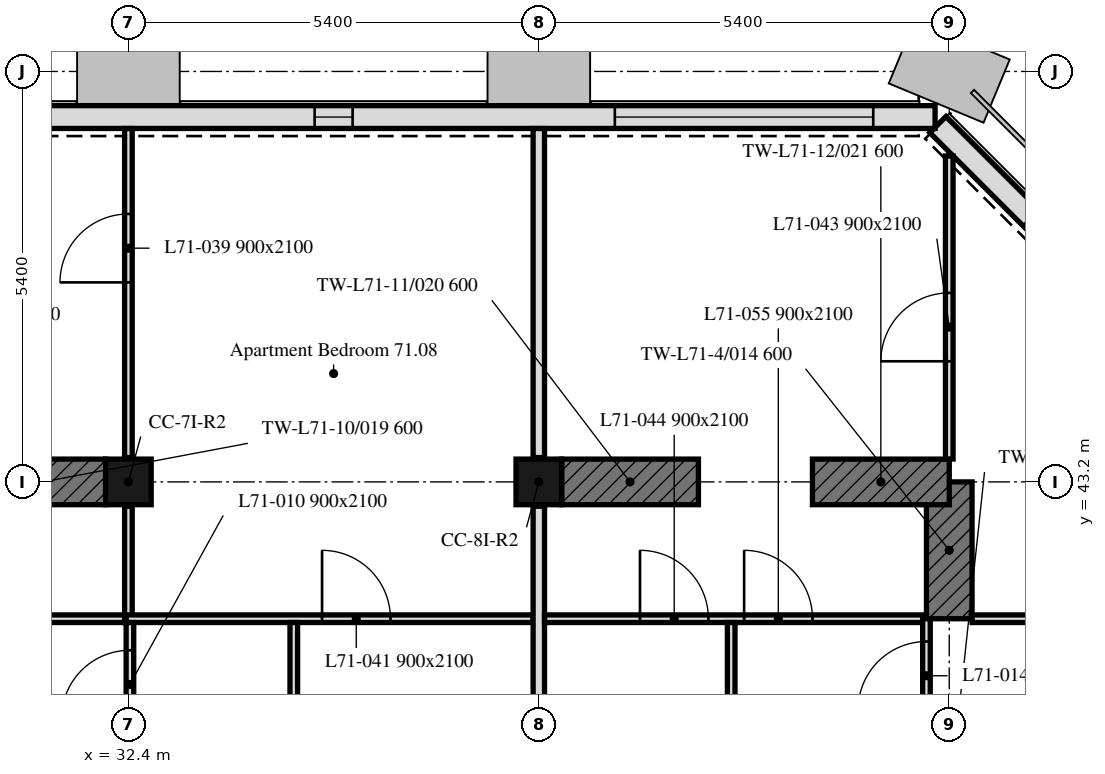
"""IFC4 building model, lengths in metres.
Left out: names, types, materials, properties, quantities, classifications, styles, units other than length and angle.
Written with IfcOpenShell. Run it as: python <this file> out.ifc"""

import sys

from ifc_helpers import new_model, si_unit, direction, frame, frame_2d, origin, origin_2d, place, context, subcontext, project, spatial, rectangle, extrude, element, fill, save


model = new_model("IFC4")
c1 = context("Model", 3, precision=1e-05, world=origin(), true_north=direction((0.0, 1.0)))
c2 = subcontext(c1, "Body", "Model", "MODEL_VIEW")
j1 = project(units=[si_unit("LENGTHUNIT", "METRE"), si_unit("PLANEANGLEUNIT", "RADIAN")], contexts=[c1])
p1 = place(None, origin())
s1 = spatial("IfcSite", under=j1, at=p1, CompositionType="ELEMENT")
p2 = place(p1, origin())
s2 = spatial("IfcBuilding", under=s1, at=p2, CompositionType="ELEMENT")
p3 = place(p2, frame((0.0, 0.0, 288.4)))
s3 = spatial("IfcBuildingStorey", under=s2, at=p3, CompositionType="ELEMENT", Elevation=288.4)
for number, where, z_axis, x_axis in (
    (1, (32.4, 43.2, 0.0), (0.0, 0.0, 1.0), (1.0, 0.0, 0.0)),
    (2, (37.8, 43.2, 0.0), (0.0, 0.0, 1.0), (1.0, 0.0, 0.0)),
):
    element("IfcColumn", number, at=place(p3, frame(where, z_axis=z_axis, x_axis=x_axis)), inside=s3, PredefinedType="COLUMN", context=c2, shape_type="SweptSolid", body=[
        extrude(rectangle(XDim=0.6, YDim=0.6, at=origin_2d()), origin(), (0.0, 0.0, 1.0), 3.0),
    ])
p4 = place(p3, frame((43.2, 41.4, 0.0), z_axis=(0.0, 0.0, 1.0), x_axis=(0.0, 1.0, 0.0)))
e3 = element("IfcWall", 3, at=p4, inside=s3, PredefinedType="SHEAR", context=c2, shape_type="SweptSolid", body=[
    extrude(rectangle(XDim=1.8, YDim=0.6, at=frame_2d((0.9, 0.0))), origin(), (0.0, 0.0, 1.0), 3.0),
])
p5 = place(p3, frame((30.45, 43.2, 0.0), z_axis=(0.0, 0.0, 1.0), x_axis=(1.0, 0.0, 0.0)))
e4 = element("IfcWall", 4, at=p5, inside=s3, PredefinedType="SHEAR", context=c2, shape_type="SweptSolid", body=[
    extrude(rectangle(XDim=1.65, YDim=0.6, at=frame_2d((0.825, 0.0))), origin(), (0.0, 0.0, 1.0), 3.0),
])
p6 = place(p3, frame((38.1, 43.2, 0.0), z_axis=(0.0, 0.0, 1.0), x_axis=(1.0, 0.0, 0.0)))
e5 = element("IfcWall", 5, at=p6, inside=s3, PredefinedType="SHEAR", context=c2, shape_type="SweptSolid", body=[
    extrude(rectangle(XDim=1.8, YDim=0.6, at=frame_2d((0.9, 0.0))), origin(), (0.0, 0.0, 1.0), 3.0),
])
p7 = place(p3, frame((41.4, 43.2, 0.0), z_axis=(0.0, 0.0, 1.0), x_axis=(1.0, 0.0, 0.0)))
e6 = element("IfcWall", 6, at=p7, inside=s3, PredefinedType="SHEAR", context=c2, shape_type="SweptSolid", body=[
    extrude(rectangle(XDim=1.8, YDim=0.6, at=frame_2d((0.9, 0.0))), origin(), (0.0, 0.0, 1.0), 3.0),
])
p8 = place(p3, frame((47.901, 43.051, 0.0), z_axis=(0.0, 0.0, 1.0), x_axis=(-0.707106781187, 0.707106781187, 0.0)))
e7 = element("IfcWall", 7, at=p8, inside=s3, PredefinedType="SOLIDWALL", context=c2, shape_type="SweptSolid", body=[
    extrude(rectangle(XDim=6.86, YDim=0.3, at=frame_2d((3.43, 0.0))), origin(), (0.0, 0.0, 1.0), 3.0),
])
p9 = place(p8, frame((1.73, 0.0, 0.9)))
e8 = element("IfcOpeningElement", 8, at=p9, cuts=e7, PredefinedType="OPENING", context=c2, shape_type="SweptSolid", body=[
    extrude(rectangle(XDim=3.4, YDim=1.7, at=frame_2d((1.7, 0.85))), frame((0.0, 0.16, 0.0), z_axis=(0.0, -1.0, 0.0), x_axis=(1.0, 0.0, 0.0)), (0.0, 0.0, 1.0), 0.32),
])
p10 = place(p3, frame((43.014, 48.0, 0.0), z_axis=(0.0, 0.0, 1.0), x_axis=(-1.0, 0.0, 0.0)))
e9 = element("IfcWall", 9, at=p10, inside=s3, PredefinedType="SOLIDWALL", context=c2, shape_type="SweptSolid", body=[
    extrude(rectangle(XDim=32.027, YDim=0.3, at=frame_2d((16.014, 0.0))), origin(), (0.0, 0.0, 1.0), 3.0),
])
p11 = place(p10, frame((0.814, 0.0, 0.9)))
e10 = element("IfcOpeningElement", 10, at=p11, cuts=e9, PredefinedType="OPENING", context=c2, shape_type="SweptSolid", body=[
    extrude(rectangle(XDim=3.4, YDim=1.7, at=frame_2d((1.7, 0.85))), frame((0.0, 0.16, 0.0), z_axis=(0.0, -1.0, 0.0), x_axis=(1.0, 0.0, 0.0)), (0.0, 0.0, 1.0), 0.32),
])
p12 = place(p10, frame((7.664, 0.0, 0.9)))
e11 = element("IfcOpeningElement", 11, at=p12, cuts=e9, PredefinedType="OPENING", context=c2, shape_type="SweptSolid", body=[
    extrude(rectangle(XDim=0.5, YDim=1.7, at=frame_2d((0.25, 0.85))), frame((0.0, 0.16, 0.0), z_axis=(0.0, -1.0, 0.0), x_axis=(1.0, 0.0, 0.0)), (0.0, 0.0, 1.0), 0.32),
])
p13 = place(p10, frame((13.064, 0.0, 0.9)))
e12 = element("IfcOpeningElement", 12, at=p13, cuts=e9, PredefinedType="OPENING", context=c2, shape_type="SweptSolid", body=[
    extrude(rectangle(XDim=0.5, YDim=1.7, at=frame_2d((0.25, 0.85))), frame((0.0, 0.16, 0.0), z_axis=(0.0, -1.0, 0.0), x_axis=(1.0, 0.0, 0.0)), (0.0, 0.0, 1.0), 0.32),
])
p14 = place(p10, frame((18.464, 0.0, 0.9)))
e13 = element("IfcOpeningElement", 13, at=p14, cuts=e9, PredefinedType="OPENING", context=c2, shape_type="SweptSolid", body=[
    extrude(rectangle(XDim=0.5, YDim=1.7, at=frame_2d((0.25, 0.85))), frame((0.0, 0.16, 0.0), z_axis=(0.0, -1.0, 0.0), x_axis=(1.0, 0.0, 0.0)), (0.0, 0.0, 1.0), 0.32),
])
p15 = place(p10, frame((23.864, 0.0, 0.9)))
e14 = element("IfcOpeningElement", 14, at=p15, cuts=e9, PredefinedType="OPENING", context=c2, shape_type="SweptSolid", body=[
    extrude(rectangle(XDim=0.5, YDim=1.7, at=frame_2d((0.25, 0.85))), frame((0.0, 0.16, 0.0), z_axis=(0.0, -1.0, 0.0), x_axis=(1.0, 0.0, 0.0)), (0.0, 0.0, 1.0), 0.32),
])
p16 = place(p10, frame((28.164, 0.0, 0.9)))
e15 = element("IfcOpeningElement", 15, at=p16, cuts=e9, PredefinedType="OPENING", context=c2, shape_type="SweptSolid", body=[
    extrude(rectangle(XDim=1.1, YDim=1.7, at=frame_2d((0.55, 0.85))), frame((0.0, 0.16, 0.0), z_axis=(0.0, -1.0, 0.0), x_axis=(1.0, 0.0, 0.0)), (0.0, 0.0, 1.0), 0.32),
])
p17 = place(p3, frame((32.4, 41.35, 0.0), z_axis=(0.0, 0.0, 1.0), x_axis=(0.0, 1.0, 0.0)))
e16 = element("IfcWall", 16, at=p17, inside=s3, PredefinedType="PARTITIONING", context=c2, shape_type="SweptSolid", body=[
    extrude(rectangle(XDim=1.53, YDim=0.1, at=frame_2d((0.765, 0.0))), origin(), (0.0, 0.0, 1.0), 2.4),
])
p18 = place(p3, frame((32.4, 43.52, 0.0), z_axis=(0.0, 0.0, 1.0), x_axis=(0.0, 1.0, 0.0)))
e17 = element("IfcWall", 17, at=p18, inside=s3, PredefinedType="PARTITIONING", context=c2, shape_type="SweptSolid", body=[
    extrude(rectangle(XDim=4.329, YDim=0.1, at=frame_2d((2.165, 0.0))), origin(), (0.0, 0.0, 1.0), 2.4),
])
p19 = place(p18, frame((2.305, 0.0, 0.0)))
e18 = element("IfcOpeningElement", 18, at=p19, cuts=e17, PredefinedType="OPENING", context=c2, shape_type="SweptSolid", body=[
    extrude(rectangle(XDim=0.9, YDim=2.1, at=frame_2d((0.45, 1.05))), frame((0.0, 0.05, 0.0), z_axis=(0.0, -1.0, 0.0), x_axis=(1.0, 0.0, 0.0)), (0.0, 0.0, 1.0), 0.1),
])
p20 = place(p3, frame((27.075, 41.4, 0.0), z_axis=(0.0, 0.0, 1.0), x_axis=(1.0, 0.0, 0.0)))
e19 = element("IfcWall", 19, at=p20, inside=s3, PredefinedType="PARTITIONING", context=c2, shape_type="SweptSolid", body=[
    extrude(rectangle(XDim=5.275, YDim=0.1, at=frame_2d((2.638, 0.0))), origin(), (0.0, 0.0, 1.0), 3.0),
])
p21 = place(p20, frame((1.495, 0.0, 0.0)))
e20 = element("IfcOpeningElement", 20, at=p21, cuts=e19, PredefinedType="OPENING", context=c2, shape_type="SweptSolid", body=[
    extrude(rectangle(XDim=0.9, YDim=2.1, at=frame_2d((0.45, 1.05))), frame((0.0, 0.05, 0.0), z_axis=(0.0, -1.0, 0.0), x_axis=(1.0, 0.0, 0.0)), (0.0, 0.0, 1.0), 0.1),
])
p22 = place(p20, frame((2.995, 0.0, 0.0)))
e21 = element("IfcOpeningElement", 21, at=p22, cuts=e19, PredefinedType="OPENING", context=c2, shape_type="SweptSolid", body=[
    extrude(rectangle(XDim=0.9, YDim=2.1, at=frame_2d((0.45, 1.05))), frame((0.0, 0.05, 0.0), z_axis=(0.0, -1.0, 0.0), x_axis=(1.0, 0.0, 0.0)), (0.0, 0.0, 1.0), 0.1),
])
p23 = place(p3, frame((37.8, 43.52, 0.0), z_axis=(0.0, 0.0, 1.0), x_axis=(0.0, 1.0, 0.0)))
e22 = element("IfcWall", 22, at=p23, inside=s3, PredefinedType="PARTITIONING", context=c2, shape_type="SweptSolid", body=[
    extrude(rectangle(XDim=4.329, YDim=0.15, at=frame_2d((2.165, 0.0))), origin(), (0.0, 0.0, 1.0), 2.4),
])
p24 = place(p3, frame((32.37, 41.4, 0.0), z_axis=(0.0, 0.0, 1.0), x_axis=(1.0, 0.0, 0.0)))
e23 = element("IfcWall", 23, at=p24, inside=s3, PredefinedType="PARTITIONING", context=c2, shape_type="SweptSolid", body=[
    extrude(rectangle(XDim=5.355, YDim=0.1, at=frame_2d((2.677, 0.0))), origin(), (0.0, 0.0, 1.0), 3.0),
])
p25 = place(p24, frame((2.578, 0.0, 0.0)))
e24 = element("IfcOpeningElement", 24, at=p25, cuts=e23, PredefinedType="OPENING", context=c2, shape_type="SweptSolid", body=[
    extrude(rectangle(XDim=0.9, YDim=2.1, at=frame_2d((0.45, 1.05))), frame((0.0, 0.05, 0.0), z_axis=(0.0, -1.0, 0.0), x_axis=(1.0, 0.0, 0.0)), (0.0, 0.0, 1.0), 0.1),
])
p26 = place(p3, frame((32.42, 38.12, 0.0), z_axis=(0.0, 0.0, 1.0), x_axis=(0.0, 1.0, 0.0)))
e25 = element("IfcWall", 25, at=p26, inside=s3, PredefinedType="PARTITIONING", context=c2, shape_type="SweptSolid", body=[
    extrude(rectangle(XDim=3.23, YDim=0.1, at=frame_2d((1.615, 0.0))), origin(), (0.0, 0.0, 1.0), 2.4),
])
p27 = place(p26, frame((1.965, 0.0, 0.0)))
e26 = element("IfcOpeningElement", 26, at=p27, cuts=e25, PredefinedType="OPENING", context=c2, shape_type="SweptSolid", body=[
    extrude(rectangle(XDim=0.9, YDim=2.1, at=frame_2d((0.45, 1.05))), frame((0.0, 0.05, 0.0), z_axis=(0.0, -1.0, 0.0), x_axis=(1.0, 0.0, 0.0)), (0.0, 0.0, 1.0), 0.1),
])
p28 = place(p3, frame((34.576, 34.725, 0.0), z_axis=(0.0, 0.0, 1.0), x_axis=(0.0, 1.0, 0.0)))
e27 = element("IfcWall", 27, at=p28, inside=s3, PredefinedType="PARTITIONING", context=c2, shape_type="SweptSolid", body=[
    extrude(rectangle(XDim=6.625, YDim=0.1, at=frame_2d((3.312, 0.0))), origin(), (0.0, 0.0, 1.0), 2.4),
])
p29 = place(p3, frame((37.8, 38.12, 0.0), z_axis=(0.0, 0.0, 1.0), x_axis=(0.0, 1.0, 0.0)))
e28 = element("IfcWall", 28, at=p29, inside=s3, PredefinedType="PARTITIONING", context=c2, shape_type="SweptSolid", body=[
    extrude(rectangle(XDim=4.76, YDim=0.15, at=frame_2d((2.38, 0.0))), origin(), (0.0, 0.0, 1.0), 2.4),
])
p30 = place(p3, frame((43.2, 43.501, 0.0), z_axis=(0.0, 0.0, 1.0), x_axis=(0.0, 1.0, 0.0)))
e29 = element("IfcWall", 29, at=p30, inside=s3, PredefinedType="PARTITIONING", context=c2, shape_type="SweptSolid", body=[
    extrude(rectangle(XDim=3.987, YDim=0.1, at=frame_2d((1.993, 0.0))), origin(), (0.0, 0.0, 1.0), 3.0),
])
p31 = place(p30, frame((1.286, 0.0, 0.0)))
e30 = element("IfcOpeningElement", 30, at=p31, cuts=e29, PredefinedType="OPENING", context=c2, shape_type="SweptSolid", body=[
    extrude(rectangle(XDim=0.9, YDim=2.1, at=frame_2d((0.45, 1.05))), frame((0.0, 0.05, 0.0), z_axis=(0.0, -1.0, 0.0), x_axis=(1.0, 0.0, 0.0)), (0.0, 0.0, 1.0), 0.1),
])
p32 = place(p3, frame((37.875, 41.4, 0.0), z_axis=(0.0, 0.0, 1.0), x_axis=(1.0, 0.0, 0.0)))
e31 = element("IfcWall", 31, at=p32, inside=s3, PredefinedType="PARTITIONING", context=c2, shape_type="SweptSolid", body=[
    extrude(rectangle(XDim=5.024, YDim=0.1, at=frame_2d((2.512, 0.0))), origin(), (0.0, 0.0, 1.0), 3.0),
])
p33 = place(p32, frame((1.256, 0.0, 0.0)))
e32 = element("IfcOpeningElement", 32, at=p33, cuts=e31, PredefinedType="OPENING", context=c2, shape_type="SweptSolid", body=[
    extrude(rectangle(XDim=0.9, YDim=2.1, at=frame_2d((0.45, 1.05))), frame((0.0, 0.05, 0.0), z_axis=(0.0, -1.0, 0.0), x_axis=(1.0, 0.0, 0.0)), (0.0, 0.0, 1.0), 0.1),
])
p34 = place(p32, frame((2.626, 0.0, 0.0)))
e33 = element("IfcOpeningElement", 33, at=p34, cuts=e31, PredefinedType="OPENING", context=c2, shape_type="SweptSolid", body=[
    extrude(rectangle(XDim=0.9, YDim=2.1, at=frame_2d((0.45, 1.05))), frame((0.0, 0.05, 0.0), z_axis=(0.0, -1.0, 0.0), x_axis=(1.0, 0.0, 0.0)), (0.0, 0.0, 1.0), 0.1),
])
p35 = place(p3, frame((43.501, 41.4, 0.0), z_axis=(0.0, 0.0, 1.0), x_axis=(1.0, 0.0, 0.0)))
e34 = element("IfcWall", 34, at=p35, inside=s3, PredefinedType="PARTITIONING", context=c2, shape_type="SweptSolid", body=[
    extrude(rectangle(XDim=4.348, YDim=0.1, at=frame_2d((2.174, 0.0))), origin(), (0.0, 0.0, 1.0), 3.0),
])
p36 = place(p35, frame((2.369, 0.0, 0.0)))
e35 = element("IfcOpeningElement", 35, at=p36, cuts=e34, PredefinedType="OPENING", context=c2, shape_type="SweptSolid", body=[
    extrude(rectangle(XDim=0.9, YDim=2.1, at=frame_2d((0.45, 1.05))), frame((0.0, 0.05, 0.0), z_axis=(0.0, -1.0, 0.0), x_axis=(1.0, 0.0, 0.0)), (0.0, 0.0, 1.0), 0.1),
])
p37 = place(p3, frame((40.331, 34.725, 0.0), z_axis=(0.0, 0.0, 1.0), x_axis=(0.0, 1.0, 0.0)))
e36 = element("IfcWall", 36, at=p37, inside=s3, PredefinedType="PARTITIONING", context=c2, shape_type="SweptSolid", body=[
    extrude(rectangle(XDim=6.625, YDim=0.1, at=frame_2d((3.312, 0.0))), origin(), (0.0, 0.0, 1.0), 2.4),
])
p38 = place(p37, frame((0.725, 0.0, 0.0)))
e37 = element("IfcOpeningElement", 37, at=p38, cuts=e36, PredefinedType="OPENING", context=c2, shape_type="SweptSolid", body=[
    extrude(rectangle(XDim=0.9, YDim=2.1, at=frame_2d((0.45, 1.05))), frame((0.0, 0.05, 0.0), z_axis=(0.0, -1.0, 0.0), x_axis=(1.0, 0.0, 0.0)), (0.0, 0.0, 1.0), 0.1),
])
p39 = place(p37, frame((4.329, 0.0, 0.0)))
e38 = element("IfcOpeningElement", 38, at=p39, cuts=e36, PredefinedType="OPENING", context=c2, shape_type="SweptSolid", body=[
    extrude(rectangle(XDim=0.9, YDim=2.1, at=frame_2d((0.45, 1.05))), frame((0.0, 0.05, 0.0), z_axis=(0.0, -1.0, 0.0), x_axis=(1.0, 0.0, 0.0)), (0.0, 0.0, 1.0), 0.1),
])
p40 = place(p3, frame((42.9, 39.9, 0.0), z_axis=(0.0, 0.0, 1.0), x_axis=(0.0, 1.0, 0.0)))
e39 = element("IfcWall", 39, at=p40, inside=s3, PredefinedType="PARTITIONING", context=c2, shape_type="SweptSolid", body=[
    extrude(rectangle(XDim=1.5, YDim=0.1, at=frame_2d((0.75, 0.0))), origin(), (0.0, 0.0, 1.0), 3.0),
])
p41 = place(p40, frame((0.3, 0.0, 0.0)))
e40 = element("IfcOpeningElement", 40, at=p41, cuts=e39, PredefinedType="OPENING", context=c2, shape_type="SweptSolid", body=[
    extrude(rectangle(XDim=0.9, YDim=2.1, at=frame_2d((0.45, 1.05))), frame((0.0, 0.05, 0.0), z_axis=(0.0, -1.0, 0.0), x_axis=(1.0, 0.0, 0.0)), (0.0, 0.0, 1.0), 0.1),
])
p42 = place(p11, origin())
e41 = element("IfcWindow", 41, at=p42, inside=s3, PartitioningType="SINGLE_PANEL", PredefinedType="WINDOW", context=c2, shape_type="SweptSolid", body=[
    extrude(rectangle(XDim=3.4, YDim=1.7, at=frame_2d((1.7, 0.85))), frame((0.0, 0.03, 0.0), z_axis=(0.0, -1.0, 0.0), x_axis=(1.0, 0.0, 0.0)), (0.0, 0.0, 1.0), 0.06),
])
fill(e10, e41)
p43 = place(p12, origin())
e42 = element("IfcWindow", 42, at=p43, inside=s3, PartitioningType="SINGLE_PANEL", PredefinedType="WINDOW", context=c2, shape_type="SweptSolid", body=[
    extrude(rectangle(XDim=0.5, YDim=1.7, at=frame_2d((0.25, 0.85))), frame((0.0, 0.03, 0.0), z_axis=(0.0, -1.0, 0.0), x_axis=(1.0, 0.0, 0.0)), (0.0, 0.0, 1.0), 0.06),
])
fill(e11, e42)
p44 = place(p27, origin())
e43 = element("IfcDoor", 43, at=p44, inside=s3, OperationType="SINGLE_SWING_RIGHT", PredefinedType="DOOR", context=c2, shape_type="SweptSolid", body=[
    extrude(rectangle(XDim=0.9, YDim=2.1, at=frame_2d((0.45, 1.05))), frame((0.0, 0.025, 0.0), z_axis=(0.0, -1.0, 0.0), x_axis=(1.0, 0.0, 0.0)), (0.0, 0.0, 1.0), 0.05),
])
fill(e26, e43)
p45 = place(p41, origin())
e44 = element("IfcDoor", 44, at=p45, inside=s3, OperationType="SINGLE_SWING_LEFT", PredefinedType="DOOR", context=c2, shape_type="SweptSolid", body=[
    extrude(rectangle(XDim=0.9, YDim=2.1, at=frame_2d((0.45, 1.05))), frame((0.0, 0.025, 0.0), z_axis=(0.0, -1.0, 0.0), x_axis=(1.0, 0.0, 0.0)), (0.0, 0.0, 1.0), 0.05),
])
fill(e40, e44)
p46 = place(p19, origin())
e45 = element("IfcDoor", 45, at=p46, inside=s3, OperationType="SINGLE_SWING_LEFT", PredefinedType="DOOR", context=c2, shape_type="SweptSolid", body=[
    extrude(rectangle(XDim=0.9, YDim=2.1, at=frame_2d((0.45, 1.05))), frame((0.0, 0.025, 0.0), z_axis=(0.0, -1.0, 0.0), x_axis=(1.0, 0.0, 0.0)), (0.0, 0.0, 1.0), 0.05),
])
fill(e18, e45)
p47 = place(p25, origin())
e46 = element("IfcDoor", 46, at=p47, inside=s3, OperationType="SINGLE_SWING_LEFT", PredefinedType="DOOR", context=c2, shape_type="SweptSolid", body=[
    extrude(rectangle(XDim=0.9, YDim=2.1, at=frame_2d((0.45, 1.05))), frame((0.0, 0.025, 0.0), z_axis=(0.0, -1.0, 0.0), x_axis=(1.0, 0.0, 0.0)), (0.0, 0.0, 1.0), 0.05),
])
fill(e24, e46)
p48 = place(p31, origin())
e47 = element("IfcDoor", 47, at=p48, inside=s3, OperationType="SINGLE_SWING_LEFT", PredefinedType="DOOR", context=c2, shape_type="SweptSolid", body=[
    extrude(rectangle(XDim=0.9, YDim=2.1, at=frame_2d((0.45, 1.05))), frame((0.0, 0.025, 0.0), z_axis=(0.0, -1.0, 0.0), x_axis=(1.0, 0.0, 0.0)), (0.0, 0.0, 1.0), 0.05),
])
fill(e30, e47)
p49 = place(p33, origin())
e48 = element("IfcDoor", 48, at=p49, inside=s3, OperationType="SINGLE_SWING_LEFT", PredefinedType="DOOR", context=c2, shape_type="SweptSolid", body=[
    extrude(rectangle(XDim=0.9, YDim=2.1, at=frame_2d((0.45, 1.05))), frame((0.0, 0.025, 0.0), z_axis=(0.0, -1.0, 0.0), x_axis=(1.0, 0.0, 0.0)), (0.0, 0.0, 1.0), 0.05),
])
fill(e32, e48)
p50 = place(p34, origin())
e49 = element("IfcDoor", 49, at=p50, inside=s3, OperationType="SINGLE_SWING_RIGHT", PredefinedType="DOOR", context=c2, shape_type="SweptSolid", body=[
    extrude(rectangle(XDim=0.9, YDim=2.1, at=frame_2d((0.45, 1.05))), frame((0.0, 0.025, 0.0), z_axis=(0.0, -1.0, 0.0), x_axis=(1.0, 0.0, 0.0)), (0.0, 0.0, 1.0), 0.05),
])
fill(e33, e49)
save(model, sys.argv[1])
